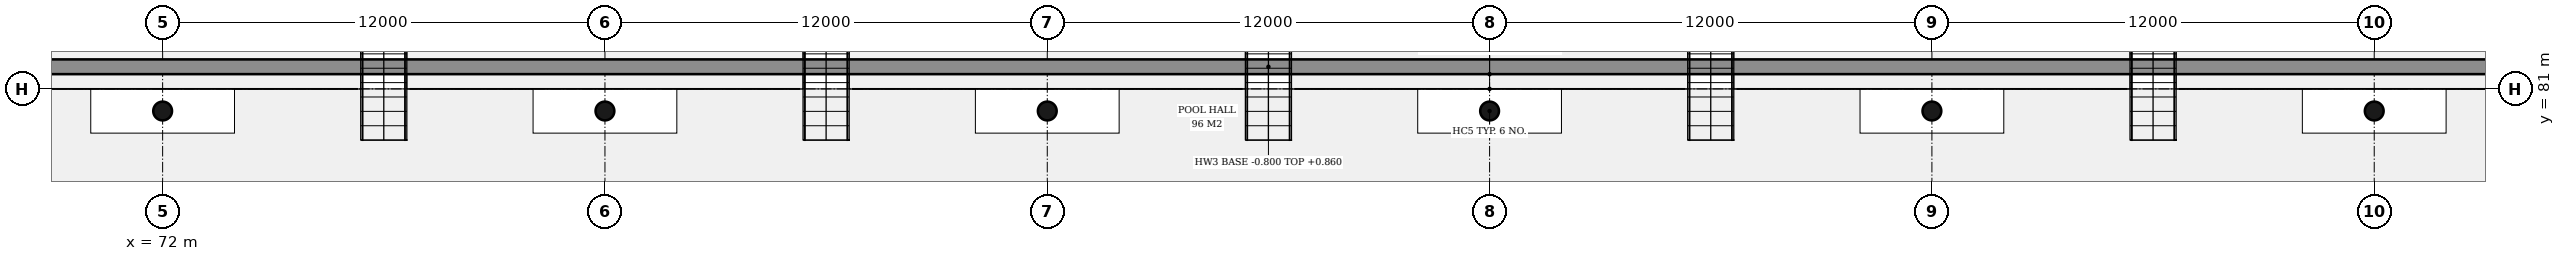
"""IFC4 building model, lengths in metres.
Left out: names, types, materials, properties, quantities, classifications, styles, units other than length and angle.
Written with IfcOpenShell. Run it as: python <this file> out.ifc"""

import sys

from ifc_helpers import new_model, si_unit, direction, frame, frame_2d, origin, origin_2d, place, context, subcontext, project, spatial, rectangle, hollow_circle, extrude, element, save


model = new_model("IFC4")
c1 = context("Model", 3, precision=1e-05, world=origin(), true_north=direction((0.0, 1.0)))
c2 = subcontext(c1, "Body", "Model", "MODEL_VIEW")
j1 = project(units=[si_unit("LENGTHUNIT", "METRE"), si_unit("PLANEANGLEUNIT", "RADIAN")], contexts=[c1])
p1 = place(None, origin())
s1 = spatial("IfcSite", under=j1, at=p1, CompositionType="ELEMENT")
p2 = place(p1, origin())
s2 = spatial("IfcBuilding", under=s1, at=p2, CompositionType="ELEMENT")
p3 = place(p2, origin())
s3 = spatial("IfcBuildingStorey", under=s2, at=p3, CompositionType="ELEMENT", Elevation=0.0)
p4 = place(p3, frame((64.0, 81.6, -0.8), z_axis=(0.0, 0.0, 1.0), x_axis=(1.0, 0.0, 0.0)))
e1 = element("IfcWall", 1, at=p4, inside=s3, PredefinedType="SOLIDWALL", context=c2, shape_type="SweptSolid", body=[
    extrude(rectangle(XDim=76.0, YDim=0.4, at=frame_2d((38.0, 0.0))), origin(), (0.0, 0.0, 1.0), 1.66),
])
for number, where, z_axis, x_axis in (
    (2, (72.0, 80.4, 0.0), (0.0, 0.0, 1.0), (1.0, 0.0, 0.0)),
    (3, (84.0, 80.4, 0.0), (0.0, 0.0, 1.0), (1.0, 0.0, 0.0)),
    (4, (96.0, 80.4, 0.0), (0.0, 0.0, 1.0), (1.0, 0.0, 0.0)),
    (5, (108.0, 80.4, 0.0), (0.0, 0.0, 1.0), (1.0, 0.0, 0.0)),
    (6, (120.0, 80.4, 0.0), (0.0, 0.0, 1.0), (1.0, 0.0, 0.0)),
    (7, (132.0, 80.4, 0.0), (0.0, 0.0, 1.0), (1.0, 0.0, 0.0)),
):
    element("IfcColumn", number, at=place(p3, frame(where, z_axis=z_axis, x_axis=x_axis)), inside=s3, PredefinedType="COLUMN", context=c2, shape_type="SweptSolid", body=[
        extrude(hollow_circle(Radius=0.254, WallThickness=0.016, at=origin_2d()), origin(), (0.0, 0.0, 1.0), 5.0),
    ])
save(model, sys.argv[1])
